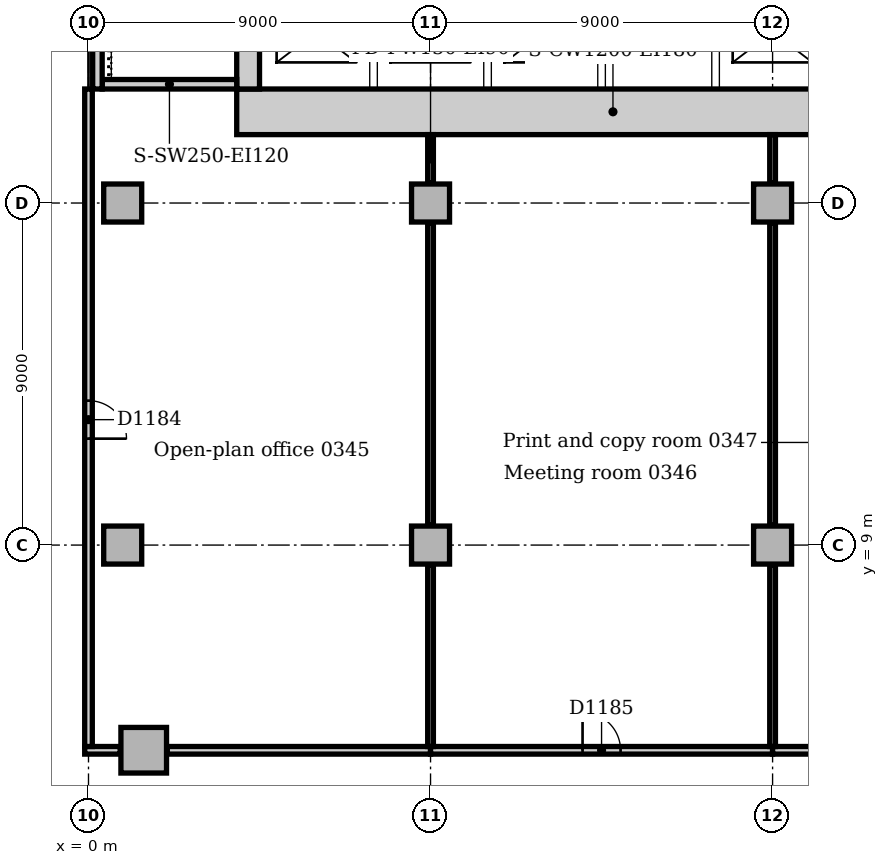
"""IFC4 building model, lengths in metres.
Left out: names, types, materials, properties, quantities, classifications, styles, units other than length and angle.
Written with IfcOpenShell. Run it as: python <this file> out.ifc"""

import sys

from ifc_helpers import new_model, si_unit, direction, frame, frame_2d, origin, origin_2d, place, context, subcontext, project, spatial, rectangle, extrude, element, fill, save


model = new_model("IFC4")
c1 = context("Model", 3, precision=1e-05, world=origin(), true_north=direction((0.0, 1.0)))
c2 = subcontext(c1, "Body", "Model", "MODEL_VIEW")
j1 = project(units=[si_unit("LENGTHUNIT", "METRE"), si_unit("PLANEANGLEUNIT", "RADIAN")], contexts=[c1])
p1 = place(None, origin())
s1 = spatial("IfcSite", under=j1, at=p1, CompositionType="ELEMENT")
p2 = place(p1, origin())
s2 = spatial("IfcBuilding", under=s1, at=p2, CompositionType="ELEMENT")
p3 = place(p2, frame((0.0, 0.0, 16.0)))
s3 = spatial("IfcBuildingStorey", under=s2, at=p3, CompositionType="ELEMENT", Elevation=16.0)
p4 = place(p3, frame((3.9, 20.4, 0.0), z_axis=(0.0, 0.0, 1.0), x_axis=(1.0, 0.0, 0.0)))
e1 = element("IfcWall", 1, at=p4, inside=s3, PredefinedType="SOLIDWALL", context=c2, shape_type="SweptSolid", body=[
    extrude(rectangle(XDim=19.8, YDim=1.2, at=frame_2d((9.9, 0.0))), origin(), (0.0, 0.0, 1.0), 5.0),
])
p5 = place(p3, frame((4.2, 31.5, 0.0), z_axis=(0.0, 0.0, 1.0), x_axis=(0.0, -1.0, 0.0)))
e2 = element("IfcWall", 2, at=p5, inside=s3, PredefinedType="SOLIDWALL", context=c2, shape_type="SweptSolid", body=[
    extrude(rectangle(XDim=10.5, YDim=0.6, at=frame_2d((5.25, 0.0))), origin(), (0.0, 0.0, 1.0), 5.0),
])
p6 = place(p5, frame((4.25, 0.0, 0.0)))
e3 = element("IfcOpeningElement", 3, at=p6, cuts=e2, PredefinedType="OPENING", context=c2, shape_type="SweptSolid", body=[
    extrude(rectangle(XDim=1.0, YDim=2.1, at=frame_2d((0.5, 1.05))), frame((0.0, 0.31, 0.0), z_axis=(0.0, -1.0, 0.0), x_axis=(1.0, 0.0, 0.0)), (0.0, 0.0, 1.0), 0.62),
])
p7 = place(p3, frame((0.36, 21.125, 0.0), z_axis=(0.0, 0.0, 1.0), x_axis=(1.0, 0.0, 0.0)))
e4 = element("IfcWall", 4, at=p7, inside=s3, PredefinedType="SOLIDWALL", context=c2, shape_type="SweptSolid", body=[
    extrude(rectangle(XDim=3.54, YDim=0.25, at=frame_2d((1.77, 0.0))), origin(), (0.0, 0.0, 1.0), 5.0),
])
p8 = place(p3, frame((0.235, 21.0, 0.0), z_axis=(0.0, 0.0, 1.0), x_axis=(0.0, 1.0, 0.0)))
e5 = element("IfcWall", 5, at=p8, inside=s3, PredefinedType="SOLIDWALL", context=c2, shape_type="SweptSolid", body=[
    extrude(rectangle(XDim=21.0, YDim=0.25, at=frame_2d((10.5, 0.0))), origin(), (0.0, 0.0, 1.0), 5.0),
])
p9 = place(p3, frame((1.453, 3.602, 0.0), z_axis=(0.0, 0.0, 1.0), x_axis=(1.0, 0.0, 0.0)))
e6 = element("IfcColumn", 6, at=p9, inside=s3, PredefinedType="COLUMN", context=c2, shape_type="SweptSolid", body=[
    extrude(rectangle(XDim=1.2, YDim=1.2, at=origin_2d()), origin(), (0.0, 0.0, 1.0), 4.7),
])
for number, where, z_axis, x_axis in (
    (7, (0.9, 9.0, 0.0), (0.0, 0.0, 1.0), (1.0, 0.0, 0.0)),
    (8, (0.9, 18.0, 0.0), (0.0, 0.0, 1.0), (1.0, 0.0, 0.0)),
    (9, (9.0, 9.0, 0.0), (0.0, 0.0, 1.0), (1.0, 0.0, 0.0)),
    (10, (9.0, 18.0, 0.0), (0.0, 0.0, 1.0), (1.0, 0.0, 0.0)),
    (11, (18.0, 9.0, 0.0), (0.0, 0.0, 1.0), (1.0, 0.0, 0.0)),
    (12, (18.0, 18.0, 0.0), (0.0, 0.0, 1.0), (1.0, 0.0, 0.0)),
):
    element("IfcColumn", number, at=place(p3, frame(where, z_axis=z_axis, x_axis=x_axis)), inside=s3, PredefinedType="COLUMN", context=c2, shape_type="SweptSolid", body=[
        extrude(rectangle(XDim=1.0, YDim=1.0, at=origin_2d()), origin(), (0.0, 0.0, 1.0), 4.7),
    ])
p10 = place(p3, frame((-0.1, 3.6, 0.0), z_axis=(0.0, 0.0, 1.0), x_axis=(1.0, 0.0, 0.0)))
e13 = element("IfcWall", 13, at=p10, inside=s3, PredefinedType="PARTITIONING", context=c2, shape_type="SweptSolid", body=[
    extrude(rectangle(XDim=0.933, YDim=0.2, at=frame_2d((0.467, 0.0))), origin(), (0.0, 0.0, 1.0), 4.7),
])
p11 = place(p3, frame((2.073, 3.6, 0.0), z_axis=(0.0, 0.0, 1.0), x_axis=(1.0, 0.0, 0.0)))
e14 = element("IfcWall", 14, at=p11, inside=s3, PredefinedType="PARTITIONING", context=c2, shape_type="SweptSolid", body=[
    extrude(rectangle(XDim=6.927, YDim=0.2, at=frame_2d((3.463, 0.0))), origin(), (0.0, 0.0, 1.0), 4.7),
])
p12 = place(p3, frame((9.0, 3.6, 0.0), z_axis=(0.0, 0.0, 1.0), x_axis=(1.0, 0.0, 0.0)))
e15 = element("IfcWall", 15, at=p12, inside=s3, PredefinedType="PARTITIONING", context=c2, shape_type="SweptSolid", body=[
    extrude(rectangle(XDim=9.0, YDim=0.2, at=frame_2d((4.5, 0.0))), origin(), (0.0, 0.0, 1.0), 4.7),
])
p13 = place(p12, frame((4.0, 0.0, 0.0)))
e16 = element("IfcOpeningElement", 16, at=p13, cuts=e15, PredefinedType="OPENING", context=c2, shape_type="SweptSolid", body=[
    extrude(rectangle(XDim=1.0, YDim=2.1, at=frame_2d((0.5, 1.05))), frame((0.0, 0.11, 0.0), z_axis=(0.0, -1.0, 0.0), x_axis=(1.0, 0.0, 0.0)), (0.0, 0.0, 1.0), 0.22),
])
p14 = place(p3, frame((18.0, 3.6, 0.0), z_axis=(0.0, 0.0, 1.0), x_axis=(1.0, 0.0, 0.0)))
e17 = element("IfcWall", 17, at=p14, inside=s3, PredefinedType="PARTITIONING", context=c2, shape_type="SweptSolid", body=[
    extrude(rectangle(XDim=4.6, YDim=0.2, at=frame_2d((2.3, 0.0))), origin(), (0.0, 0.0, 1.0), 4.7),
])
p15 = place(p3, frame((0.0, 3.7, 0.0), z_axis=(0.0, 0.0, 1.0), x_axis=(0.0, 1.0, 0.0)))
e18 = element("IfcWall", 18, at=p15, inside=s3, PredefinedType="PARTITIONING", context=c2, shape_type="SweptSolid", body=[
    extrude(rectangle(XDim=17.3, YDim=0.2, at=frame_2d((8.65, 0.0))), origin(), (0.0, 0.0, 1.0), 4.7),
])
p16 = place(p15, frame((8.1, 0.0, 0.0)))
e19 = element("IfcOpeningElement", 19, at=p16, cuts=e18, PredefinedType="OPENING", context=c2, shape_type="SweptSolid", body=[
    extrude(rectangle(XDim=1.0, YDim=2.1, at=frame_2d((0.5, 1.05))), frame((0.0, 0.11, 0.0), z_axis=(0.0, -1.0, 0.0), x_axis=(1.0, 0.0, 0.0)), (0.0, 0.0, 1.0), 0.22),
])
p17 = place(p3, frame((9.0, 3.7, 0.0), z_axis=(0.0, 0.0, 1.0), x_axis=(0.0, 1.0, 0.0)))
e20 = element("IfcWall", 20, at=p17, inside=s3, PredefinedType="PARTITIONING", context=c2, shape_type="SweptSolid", body=[
    extrude(rectangle(XDim=4.78, YDim=0.15, at=frame_2d((2.39, 0.0))), origin(), (0.0, 0.0, 1.0), 4.7),
])
p18 = place(p3, frame((9.0, 9.52, 0.0), z_axis=(0.0, 0.0, 1.0), x_axis=(0.0, 1.0, 0.0)))
e21 = element("IfcWall", 21, at=p18, inside=s3, PredefinedType="PARTITIONING", context=c2, shape_type="SweptSolid", body=[
    extrude(rectangle(XDim=7.96, YDim=0.15, at=frame_2d((3.98, 0.0))), origin(), (0.0, 0.0, 1.0), 4.7),
])
p19 = place(p3, frame((9.0, 18.52, 0.0), z_axis=(0.0, 0.0, 1.0), x_axis=(0.0, 1.0, 0.0)))
e22 = element("IfcWall", 22, at=p19, inside=s3, PredefinedType="PARTITIONING", context=c2, shape_type="SweptSolid", body=[
    extrude(rectangle(XDim=1.28, YDim=0.15, at=frame_2d((0.64, 0.0))), origin(), (0.0, 0.0, 1.0), 4.7),
])
p20 = place(p3, frame((18.0, 3.7, 0.0), z_axis=(0.0, 0.0, 1.0), x_axis=(0.0, 1.0, 0.0)))
e23 = element("IfcWall", 23, at=p20, inside=s3, PredefinedType="PARTITIONING", context=c2, shape_type="SweptSolid", body=[
    extrude(rectangle(XDim=4.78, YDim=0.15, at=frame_2d((2.39, 0.0))), origin(), (0.0, 0.0, 1.0), 4.7),
])
p21 = place(p3, frame((18.0, 9.52, 0.0), z_axis=(0.0, 0.0, 1.0), x_axis=(0.0, 1.0, 0.0)))
e24 = element("IfcWall", 24, at=p21, inside=s3, PredefinedType="PARTITIONING", context=c2, shape_type="SweptSolid", body=[
    extrude(rectangle(XDim=7.96, YDim=0.15, at=frame_2d((3.98, 0.0))), origin(), (0.0, 0.0, 1.0), 4.7),
])
p22 = place(p3, frame((18.0, 18.52, 0.0), z_axis=(0.0, 0.0, 1.0), x_axis=(0.0, 1.0, 0.0)))
e25 = element("IfcWall", 25, at=p22, inside=s3, PredefinedType="PARTITIONING", context=c2, shape_type="SweptSolid", body=[
    extrude(rectangle(XDim=1.28, YDim=0.15, at=frame_2d((0.64, 0.0))), origin(), (0.0, 0.0, 1.0), 4.7),
])
p23 = place(p3, frame((0.48, 21.25, 0.0), z_axis=(0.0, 0.0, 1.0), x_axis=(0.0, 1.0, 0.0)))
e26 = element("IfcWall", 26, at=p23, inside=s3, PredefinedType="STANDARD", context=c2, shape_type="SweptSolid", body=[
    extrude(rectangle(XDim=1.955, YDim=0.24, at=frame_2d((0.978, 0.0))), origin(), (0.0, 0.0, 1.0), 5.0),
])
for number, where, z_axis, x_axis in (
    (27, (7.5, 21.0, 0.0), (0.0, 0.0, 1.0), (0.0, 1.0, 0.0)),
    (28, (10.5, 21.0, 0.0), (0.0, 0.0, 1.0), (0.0, 1.0, 0.0)),
    (29, (13.5, 21.0, 0.0), (0.0, 0.0, 1.0), (0.0, 1.0, 0.0)),
    (30, (16.5, 21.0, 0.0), (0.0, 0.0, 1.0), (0.0, 1.0, 0.0)),
):
    element("IfcWall", number, at=place(p3, frame(where, z_axis=z_axis, x_axis=x_axis)), inside=s3, PredefinedType="PARTITIONING", context=c2, shape_type="SweptSolid", body=[
        extrude(rectangle(XDim=2.9, YDim=0.2, at=frame_2d((1.45, 0.0))), origin(), (0.0, 0.0, 1.0), 4.7),
    ])
p24 = place(p16, frame((1.0, 0.0, 0.0), z_axis=(0.0, 0.0, 1.0), x_axis=(-1.0, 0.0, 0.0)))
e31 = element("IfcDoor", 31, at=p24, inside=s3, OperationType="SINGLE_SWING_RIGHT", PredefinedType="DOOR", context=c2, shape_type="SweptSolid", body=[
    extrude(rectangle(XDim=1.0, YDim=2.1, at=frame_2d((0.5, 1.05))), frame((0.0, 0.025, 0.0), z_axis=(0.0, -1.0, 0.0), x_axis=(1.0, 0.0, 0.0)), (0.0, 0.0, 1.0), 0.05),
])
fill(e19, e31)
p25 = place(p13, origin())
e32 = element("IfcDoor", 32, at=p25, inside=s3, OperationType="SINGLE_SWING_LEFT", PredefinedType="DOOR", context=c2, shape_type="SweptSolid", body=[
    extrude(rectangle(XDim=1.0, YDim=2.1, at=frame_2d((0.5, 1.05))), frame((0.0, 0.025, 0.0), z_axis=(0.0, -1.0, 0.0), x_axis=(1.0, 0.0, 0.0)), (0.0, 0.0, 1.0), 0.05),
])
fill(e16, e32)
save(model, sys.argv[1])
